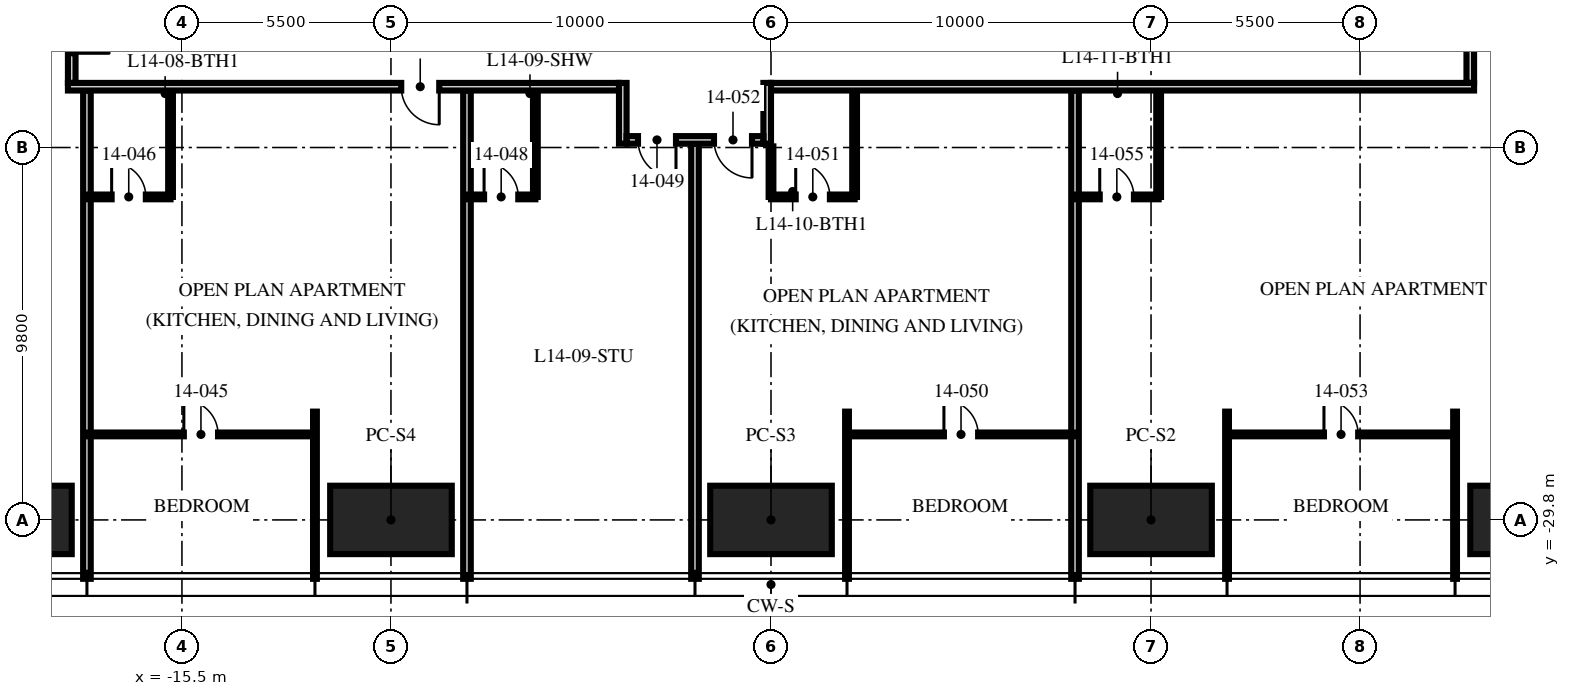
"""IFC4 building model, lengths in metres.
Left out: names, types, materials, properties, quantities, classifications, styles, units other than length and angle.
Written with IfcOpenShell. Run it as: python <this file> out.ifc"""

import sys

from ifc_helpers import new_model, si_unit, direction, frame, frame_2d, origin, origin_2d, place, context, subcontext, project, spatial, rectangle, hollow_rectangle, extrude, element, fill, save


model = new_model("IFC4")
c1 = context("Model", 3, precision=1e-05, world=origin(), true_north=direction((0.0, 1.0)))
c2 = subcontext(c1, "Body", "Model", "MODEL_VIEW")
j1 = project(units=[si_unit("LENGTHUNIT", "METRE"), si_unit("PLANEANGLEUNIT", "RADIAN")], contexts=[c1])
p1 = place(None, origin())
s1 = spatial("IfcSite", under=j1, at=p1, CompositionType="ELEMENT")
p2 = place(p1, origin())
s2 = spatial("IfcBuilding", under=s1, at=p2, CompositionType="ELEMENT")
p3 = place(p2, frame((0.0, 0.0, 58.5)))
s3 = spatial("IfcBuildingStorey", under=s2, at=p3, CompositionType="ELEMENT", Elevation=58.5)
for number, where, z_axis, x_axis in (
    (1, (20.0, -29.8, 0.0), (0.0, 0.0, 1.0), (1.0, 0.0, 0.0)),
    (2, (10.0, -29.8, 0.0), (0.0, 0.0, 1.0), (1.0, 0.0, 0.0)),
    (3, (0.0, -29.8, 0.0), (0.0, 0.0, 1.0), (1.0, 0.0, 0.0)),
    (4, (-10.0, -29.8, 0.0), (0.0, 0.0, 1.0), (1.0, 0.0, 0.0)),
    (5, (-20.0, -29.8, 0.0), (0.0, 0.0, 1.0), (1.0, 0.0, 0.0)),
):
    element("IfcColumn", number, at=place(p3, frame(where, z_axis=z_axis, x_axis=x_axis)), inside=s3, PredefinedType="COLUMN", context=c2, shape_type="SweptSolid", body=[
        extrude(hollow_rectangle(XDim=3.2, YDim=1.8, WallThickness=0.2, at=origin_2d()), origin(), (0.0, 0.0, 1.0), 3.75),
    ])
p4 = place(p3, frame((-18.0, -18.5, 0.0), z_axis=(0.0, 0.0, 1.0), x_axis=(0.0, -1.0, 0.0)))
e6 = element("IfcWall", 6, at=p4, inside=s3, PredefinedType="PARTITIONING", context=c2, shape_type="SweptSolid", body=[
    extrude(rectangle(XDim=12.85, YDim=0.2, at=frame_2d((6.425, 0.0))), origin(), (0.0, 0.0, 1.0), 2.3),
])
p5 = place(p3, frame((-12.0, -26.95, 0.0), z_axis=(0.0, 0.0, 1.0), x_axis=(0.0, -1.0, 0.0)))
e7 = element("IfcWall", 7, at=p5, inside=s3, PredefinedType="PARTITIONING", context=c2, shape_type="SweptSolid", body=[
    extrude(rectangle(XDim=4.4, YDim=0.1, at=frame_2d((2.2, 0.0))), origin(), (0.0, 0.0, 1.0), 2.71),
])
p6 = place(p3, frame((-8.0, -18.5, 0.0), z_axis=(0.0, 0.0, 1.0), x_axis=(0.0, -1.0, 0.0)))
e8 = element("IfcWall", 8, at=p6, inside=s3, PredefinedType="PARTITIONING", context=c2, shape_type="SweptSolid", body=[
    extrude(rectangle(XDim=12.85, YDim=0.2, at=frame_2d((6.425, 0.0))), origin(), (0.0, 0.0, 1.0), 2.71),
])
p7 = place(p3, frame((-2.0, -19.9, 0.0), z_axis=(0.0, 0.0, 1.0), x_axis=(0.0, -1.0, 0.0)))
e9 = element("IfcWall", 9, at=p7, inside=s3, PredefinedType="PARTITIONING", context=c2, shape_type="SweptSolid", body=[
    extrude(rectangle(XDim=11.45, YDim=0.2, at=frame_2d((5.725, 0.0))), origin(), (0.0, 0.0, 1.0), 2.71),
])
p8 = place(p3, frame((2.0, -26.95, 0.0), z_axis=(0.0, 0.0, 1.0), x_axis=(0.0, -1.0, 0.0)))
e10 = element("IfcWall", 10, at=p8, inside=s3, PredefinedType="PARTITIONING", context=c2, shape_type="SweptSolid", body=[
    extrude(rectangle(XDim=4.4, YDim=0.1, at=frame_2d((2.2, 0.0))), origin(), (0.0, 0.0, 1.0), 2.71),
])
p9 = place(p3, frame((8.0, -18.5, 0.0), z_axis=(0.0, 0.0, 1.0), x_axis=(0.0, -1.0, 0.0)))
e11 = element("IfcWall", 11, at=p9, inside=s3, PredefinedType="PARTITIONING", context=c2, shape_type="SweptSolid", body=[
    extrude(rectangle(XDim=12.85, YDim=0.2, at=frame_2d((6.425, 0.0))), origin(), (0.0, 0.0, 1.0), 2.71),
])
for number, where, z_axis, x_axis in (
    (12, (12.0, -26.95, 0.0), (0.0, 0.0, 1.0), (0.0, -1.0, 0.0)),
    (13, (18.0, -26.95, 0.0), (0.0, 0.0, 1.0), (0.0, -1.0, 0.0)),
):
    element("IfcWall", number, at=place(p3, frame(where, z_axis=z_axis, x_axis=x_axis)), inside=s3, PredefinedType="PARTITIONING", context=c2, shape_type="SweptSolid", body=[
        extrude(rectangle(XDim=4.4, YDim=0.1, at=frame_2d((2.2, 0.0))), origin(), (0.0, 0.0, 1.0), 2.71),
    ])
p10 = place(p3, frame((-18.0, -27.55, 0.0), z_axis=(0.0, 0.0, 1.0), x_axis=(1.0, 0.0, 0.0)))
e14 = element("IfcWall", 14, at=p10, inside=s3, PredefinedType="PARTITIONING", context=c2, shape_type="SweptSolid", body=[
    extrude(rectangle(XDim=6.0, YDim=0.1, at=frame_2d((3.0, 0.0))), origin(), (0.0, 0.0, 1.0), 2.61),
])
p11 = place(p10, frame((2.55, 0.0, 0.0)))
e15 = element("IfcOpeningElement", 15, at=p11, cuts=e14, PredefinedType="OPENING", context=c2, shape_type="SweptSolid", body=[
    extrude(rectangle(XDim=0.9, YDim=2.1, at=frame_2d((0.45, 1.05))), frame((0.0, 0.06, 0.0), z_axis=(0.0, -1.0, 0.0), x_axis=(1.0, 0.0, 0.0)), (0.0, 0.0, 1.0), 0.12),
])
p12 = place(p3, frame((-18.0, -21.3, 0.0), z_axis=(0.0, 0.0, 1.0), x_axis=(1.0, 0.0, 0.0)))
e16 = element("IfcWall", 16, at=p12, inside=s3, PredefinedType="PARTITIONING", context=c2, shape_type="SweptSolid", body=[
    extrude(rectangle(XDim=2.2, YDim=0.125, at=frame_2d((1.1, 0.0))), origin(), (0.0, 0.0, 1.0), 3.5),
])
p13 = place(p12, frame((0.65, 0.0, 0.0)))
e17 = element("IfcOpeningElement", 17, at=p13, cuts=e16, PredefinedType="OPENING", context=c2, shape_type="SweptSolid", body=[
    extrude(rectangle(XDim=0.9, YDim=2.1, at=frame_2d((0.45, 1.05))), frame((0.0, 0.073, 0.0), z_axis=(0.0, -1.0, 0.0), x_axis=(1.0, 0.0, 0.0)), (0.0, 0.0, 1.0), 0.145),
])
p14 = place(p3, frame((-15.8, -18.5, 0.0), z_axis=(0.0, 0.0, 1.0), x_axis=(0.0, -1.0, 0.0)))
e18 = element("IfcWall", 18, at=p14, inside=s3, PredefinedType="PARTITIONING", context=c2, shape_type="SweptSolid", body=[
    extrude(rectangle(XDim=2.8, YDim=0.125, at=frame_2d((1.4, 0.0))), origin(), (0.0, 0.0, 1.0), 3.5),
])
p15 = place(p3, frame((-8.0, -21.3, 0.0), z_axis=(0.0, 0.0, 1.0), x_axis=(1.0, 0.0, 0.0)))
e19 = element("IfcWall", 19, at=p15, inside=s3, PredefinedType="PARTITIONING", context=c2, shape_type="SweptSolid", body=[
    extrude(rectangle(XDim=1.8, YDim=0.125, at=frame_2d((0.9, 0.0))), origin(), (0.0, 0.0, 1.0), 3.5),
])
p16 = place(p15, frame((0.45, 0.0, 0.0)))
e20 = element("IfcOpeningElement", 20, at=p16, cuts=e19, PredefinedType="OPENING", context=c2, shape_type="SweptSolid", body=[
    extrude(rectangle(XDim=0.9, YDim=2.1, at=frame_2d((0.45, 1.05))), frame((0.0, 0.073, 0.0), z_axis=(0.0, -1.0, 0.0), x_axis=(1.0, 0.0, 0.0)), (0.0, 0.0, 1.0), 0.145),
])
p17 = place(p3, frame((-6.2, -18.5, 0.0), z_axis=(0.0, 0.0, 1.0), x_axis=(0.0, -1.0, 0.0)))
e21 = element("IfcWall", 21, at=p17, inside=s3, PredefinedType="PARTITIONING", context=c2, shape_type="SweptSolid", body=[
    extrude(rectangle(XDim=2.8, YDim=0.125, at=frame_2d((1.4, 0.0))), origin(), (0.0, 0.0, 1.0), 3.5),
])
p18 = place(p3, frame((2.0, -27.55, 0.0), z_axis=(0.0, 0.0, 1.0), x_axis=(1.0, 0.0, 0.0)))
e22 = element("IfcWall", 22, at=p18, inside=s3, PredefinedType="PARTITIONING", context=c2, shape_type="SweptSolid", body=[
    extrude(rectangle(XDim=6.0, YDim=0.1, at=frame_2d((3.0, 0.0))), origin(), (0.0, 0.0, 1.0), 2.61),
])
p19 = place(p18, frame((2.55, 0.0, 0.0)))
e23 = element("IfcOpeningElement", 23, at=p19, cuts=e22, PredefinedType="OPENING", context=c2, shape_type="SweptSolid", body=[
    extrude(rectangle(XDim=0.9, YDim=2.1, at=frame_2d((0.45, 1.05))), frame((0.0, 0.06, 0.0), z_axis=(0.0, -1.0, 0.0), x_axis=(1.0, 0.0, 0.0)), (0.0, 0.0, 1.0), 0.12),
])
p20 = place(p3, frame((0.0, -21.3, 0.0), z_axis=(0.0, 0.0, 1.0), x_axis=(1.0, 0.0, 0.0)))
e24 = element("IfcWall", 24, at=p20, inside=s3, PredefinedType="PARTITIONING", context=c2, shape_type="SweptSolid", body=[
    extrude(rectangle(XDim=2.2, YDim=0.125, at=frame_2d((1.1, 0.0))), origin(), (0.0, 0.0, 1.0), 2.492),
])
p21 = place(p20, frame((0.65, 0.0, 0.0)))
e25 = element("IfcOpeningElement", 25, at=p21, cuts=e24, PredefinedType="OPENING", context=c2, shape_type="SweptSolid", body=[
    extrude(rectangle(XDim=0.9, YDim=2.1, at=frame_2d((0.45, 1.05))), frame((0.0, 0.073, 0.0), z_axis=(0.0, -1.0, 0.0), x_axis=(1.0, 0.0, 0.0)), (0.0, 0.0, 1.0), 0.145),
])
p22 = place(p3, frame((0.0, -19.97, 0.0), z_axis=(0.0, 0.0, 1.0), x_axis=(0.0, -1.0, 0.0)))
e26 = element("IfcWall", 26, at=p22, inside=s3, PredefinedType="PARTITIONING", context=c2, shape_type="SweptSolid", body=[
    extrude(rectangle(XDim=1.33, YDim=0.125, at=frame_2d((0.665, 0.0))), origin(), (0.0, 0.0, 1.0), 2.492),
])
p23 = place(p3, frame((2.2, -18.5, 0.0), z_axis=(0.0, 0.0, 1.0), x_axis=(0.0, -1.0, 0.0)))
e27 = element("IfcWall", 27, at=p23, inside=s3, PredefinedType="PARTITIONING", context=c2, shape_type="SweptSolid", body=[
    extrude(rectangle(XDim=2.8, YDim=0.125, at=frame_2d((1.4, 0.0))), origin(), (0.0, 0.0, 1.0), 3.5),
])
p24 = place(p3, frame((12.0, -27.55, 0.0), z_axis=(0.0, 0.0, 1.0), x_axis=(1.0, 0.0, 0.0)))
e28 = element("IfcWall", 28, at=p24, inside=s3, PredefinedType="PARTITIONING", context=c2, shape_type="SweptSolid", body=[
    extrude(rectangle(XDim=6.0, YDim=0.1, at=frame_2d((3.0, 0.0))), origin(), (0.0, 0.0, 1.0), 2.61),
])
p25 = place(p24, frame((2.55, 0.0, 0.0)))
e29 = element("IfcOpeningElement", 29, at=p25, cuts=e28, PredefinedType="OPENING", context=c2, shape_type="SweptSolid", body=[
    extrude(rectangle(XDim=0.9, YDim=2.1, at=frame_2d((0.45, 1.05))), frame((0.0, 0.06, 0.0), z_axis=(0.0, -1.0, 0.0), x_axis=(1.0, 0.0, 0.0)), (0.0, 0.0, 1.0), 0.12),
])
p26 = place(p3, frame((8.0, -21.3, 0.0), z_axis=(0.0, 0.0, 1.0), x_axis=(1.0, 0.0, 0.0)))
e30 = element("IfcWall", 30, at=p26, inside=s3, PredefinedType="PARTITIONING", context=c2, shape_type="SweptSolid", body=[
    extrude(rectangle(XDim=2.2, YDim=0.125, at=frame_2d((1.1, 0.0))), origin(), (0.0, 0.0, 1.0), 2.492),
])
p27 = place(p26, frame((0.65, 0.0, 0.0)))
e31 = element("IfcOpeningElement", 31, at=p27, cuts=e30, PredefinedType="OPENING", context=c2, shape_type="SweptSolid", body=[
    extrude(rectangle(XDim=0.9, YDim=2.1, at=frame_2d((0.45, 1.05))), frame((0.0, 0.073, 0.0), z_axis=(0.0, -1.0, 0.0), x_axis=(1.0, 0.0, 0.0)), (0.0, 0.0, 1.0), 0.145),
])
p28 = place(p3, frame((10.2, -18.5, 0.0), z_axis=(0.0, 0.0, 1.0), x_axis=(0.0, -1.0, 0.0)))
e32 = element("IfcWall", 32, at=p28, inside=s3, PredefinedType="PARTITIONING", context=c2, shape_type="SweptSolid", body=[
    extrude(rectangle(XDim=2.8, YDim=0.125, at=frame_2d((1.4, 0.0))), origin(), (0.0, 0.0, 1.0), 2.492),
])
p29 = place(p3, frame((18.4, -18.3, 0.0), z_axis=(0.0, 0.0, 1.0), x_axis=(0.0, 1.0, 0.0)))
e33 = element("IfcWall", 33, at=p29, inside=s3, PredefinedType="PARTITIONING", context=c2, shape_type="SweptSolid", body=[
    extrude(rectangle(XDim=8.3, YDim=0.2, at=frame_2d((4.15, 0.0))), origin(), (0.0, 0.0, 1.0), 2.3),
])
p30 = place(p3, frame((-18.4, 6.0, 0.0), z_axis=(0.0, 0.0, 1.0), x_axis=(0.0, -1.0, 0.0)))
e34 = element("IfcWall", 34, at=p30, inside=s3, PredefinedType="PARTITIONING", context=c2, shape_type="SweptSolid", body=[
    extrude(rectangle(XDim=24.3, YDim=0.2, at=frame_2d((12.15, 0.0))), origin(), (0.0, 0.0, 1.0), 2.3),
])
p31 = place(p30, frame((22.52, 0.0, 0.0)))
e35 = element("IfcOpeningElement", 35, at=p31, cuts=e34, PredefinedType="OPENING", context=c2, shape_type="SweptSolid", body=[
    extrude(rectangle(XDim=1.0, YDim=2.2, at=frame_2d((0.5, 1.1))), frame((0.0, 0.11, 0.0), z_axis=(0.0, -1.0, 0.0), x_axis=(1.0, 0.0, 0.0)), (0.0, 0.0, 1.0), 0.22),
])
p32 = place(p3, frame((18.5, -18.4, 0.0), z_axis=(0.0, 0.0, 1.0), x_axis=(-1.0, 0.0, 0.0)))
e36 = element("IfcWall", 36, at=p32, inside=s3, PredefinedType="PARTITIONING", context=c2, shape_type="SweptSolid", body=[
    extrude(rectangle(XDim=18.5, YDim=0.2, at=frame_2d((9.25, 0.0))), origin(), (0.0, 0.0, 1.0), 2.3),
])
p33 = place(p3, frame((-0.1, -18.3, 0.0), z_axis=(0.0, 0.0, 1.0), x_axis=(0.0, -1.0, 0.0)))
e37 = element("IfcWall", 37, at=p33, inside=s3, PredefinedType="PARTITIONING", context=c2, shape_type="SweptSolid", body=[
    extrude(rectangle(XDim=1.6, YDim=0.2, at=frame_2d((0.8, 0.0))), origin(), (0.0, 0.0, 1.0), 2.492),
])
p34 = place(p3, frame((-3.9, -18.3, 0.0), z_axis=(0.0, 0.0, 1.0), x_axis=(0.0, -1.0, 0.0)))
e38 = element("IfcWall", 38, at=p34, inside=s3, PredefinedType="PARTITIONING", context=c2, shape_type="SweptSolid", body=[
    extrude(rectangle(XDim=1.6, YDim=0.2, at=frame_2d((0.8, 0.0))), origin(), (0.0, 0.0, 1.0), 3.5),
])
p35 = place(p3, frame((-0.2, -19.8, 0.0), z_axis=(0.0, 0.0, 1.0), x_axis=(-1.0, 0.0, 0.0)))
e39 = element("IfcWall", 39, at=p35, inside=s3, PredefinedType="PARTITIONING", context=c2, shape_type="SweptSolid", body=[
    extrude(rectangle(XDim=3.6, YDim=0.2, at=frame_2d((1.8, 0.0))), origin(), (0.0, 0.0, 1.0), 3.5),
])
p36 = place(p35, frame((2.3, 0.0, 0.0)))
e40 = element("IfcOpeningElement", 40, at=p36, cuts=e39, PredefinedType="OPENING", context=c2, shape_type="SweptSolid", body=[
    extrude(rectangle(XDim=1.0, YDim=2.2, at=frame_2d((0.5, 1.1))), frame((0.0, 0.11, 0.0), z_axis=(0.0, -1.0, 0.0), x_axis=(1.0, 0.0, 0.0)), (0.0, 0.0, 1.0), 0.22),
])
p37 = place(p35, frame((0.3, 0.0, 0.0)))
e41 = element("IfcOpeningElement", 41, at=p37, cuts=e39, PredefinedType="OPENING", context=c2, shape_type="SweptSolid", body=[
    extrude(rectangle(XDim=1.0, YDim=2.2, at=frame_2d((0.5, 1.1))), frame((0.0, 0.11, 0.0), z_axis=(0.0, -1.0, 0.0), x_axis=(1.0, 0.0, 0.0)), (0.0, 0.0, 1.0), 0.22),
])
p38 = place(p3, frame((-4.0, -18.4, 0.0), z_axis=(0.0, 0.0, 1.0), x_axis=(-1.0, 0.0, 0.0)))
e42 = element("IfcWall", 42, at=p38, inside=s3, PredefinedType="PARTITIONING", context=c2, shape_type="SweptSolid", body=[
    extrude(rectangle(XDim=14.5, YDim=0.2, at=frame_2d((7.25, 0.0))), origin(), (0.0, 0.0, 1.0), 2.3),
])
p39 = place(p38, frame((4.73, 0.0, 0.0)))
e43 = element("IfcOpeningElement", 43, at=p39, cuts=e42, PredefinedType="OPENING", context=c2, shape_type="SweptSolid", body=[
    extrude(rectangle(XDim=1.0, YDim=2.2, at=frame_2d((0.5, 1.1))), frame((0.0, 0.11, 0.0), z_axis=(0.0, -1.0, 0.0), x_axis=(1.0, 0.0, 0.0)), (0.0, 0.0, 1.0), 0.22),
])
p40 = place(p31, origin())
e44 = element("IfcDoor", 44, at=p40, inside=s3, OperationType="SINGLE_SWING_RIGHT", PredefinedType="DOOR", context=c2, shape_type="SweptSolid", body=[
    extrude(rectangle(XDim=1.0, YDim=2.2, at=frame_2d((0.5, 1.1))), frame((0.0, 0.025, 0.0), z_axis=(0.0, -1.0, 0.0), x_axis=(1.0, 0.0, 0.0)), (0.0, 0.0, 1.0), 0.05),
])
fill(e35, e44)
p41 = place(p11, origin())
e45 = element("IfcDoor", 45, at=p41, inside=s3, OperationType="SINGLE_SWING_LEFT", PredefinedType="DOOR", context=c2, shape_type="SweptSolid", body=[
    extrude(rectangle(XDim=0.9, YDim=2.1, at=frame_2d((0.45, 1.05))), frame((0.0, 0.025, 0.0), z_axis=(0.0, -1.0, 0.0), x_axis=(1.0, 0.0, 0.0)), (0.0, 0.0, 1.0), 0.05),
])
fill(e15, e45)
p42 = place(p13, origin())
e46 = element("IfcDoor", 46, at=p42, inside=s3, OperationType="SINGLE_SWING_LEFT", PredefinedType="DOOR", context=c2, shape_type="SweptSolid", body=[
    extrude(rectangle(XDim=0.9, YDim=2.1, at=frame_2d((0.45, 1.05))), frame((0.0, 0.025, 0.0), z_axis=(0.0, -1.0, 0.0), x_axis=(1.0, 0.0, 0.0)), (0.0, 0.0, 1.0), 0.05),
])
fill(e17, e46)
p43 = place(p39, origin())
e47 = element("IfcDoor", 47, at=p43, inside=s3, OperationType="SINGLE_SWING_LEFT", PredefinedType="DOOR", context=c2, shape_type="SweptSolid", body=[
    extrude(rectangle(XDim=1.0, YDim=2.2, at=frame_2d((0.5, 1.1))), frame((0.0, 0.025, 0.0), z_axis=(0.0, -1.0, 0.0), x_axis=(1.0, 0.0, 0.0)), (0.0, 0.0, 1.0), 0.05),
])
fill(e43, e47)
p44 = place(p16, origin())
e48 = element("IfcDoor", 48, at=p44, inside=s3, OperationType="SINGLE_SWING_LEFT", PredefinedType="DOOR", context=c2, shape_type="SweptSolid", body=[
    extrude(rectangle(XDim=0.9, YDim=2.1, at=frame_2d((0.45, 1.05))), frame((0.0, 0.025, 0.0), z_axis=(0.0, -1.0, 0.0), x_axis=(1.0, 0.0, 0.0)), (0.0, 0.0, 1.0), 0.05),
])
fill(e20, e48)
p45 = place(p36, origin())
e49 = element("IfcDoor", 49, at=p45, inside=s3, OperationType="SINGLE_SWING_LEFT", PredefinedType="DOOR", context=c2, shape_type="SweptSolid", body=[
    extrude(rectangle(XDim=1.0, YDim=2.2, at=frame_2d((0.5, 1.1))), frame((0.0, 0.025, 0.0), z_axis=(0.0, -1.0, 0.0), x_axis=(1.0, 0.0, 0.0)), (0.0, 0.0, 1.0), 0.05),
])
fill(e40, e49)
p46 = place(p19, origin())
e50 = element("IfcDoor", 50, at=p46, inside=s3, OperationType="SINGLE_SWING_LEFT", PredefinedType="DOOR", context=c2, shape_type="SweptSolid", body=[
    extrude(rectangle(XDim=0.9, YDim=2.1, at=frame_2d((0.45, 1.05))), frame((0.0, 0.025, 0.0), z_axis=(0.0, -1.0, 0.0), x_axis=(1.0, 0.0, 0.0)), (0.0, 0.0, 1.0), 0.05),
])
fill(e23, e50)
p47 = place(p21, origin())
e51 = element("IfcDoor", 51, at=p47, inside=s3, OperationType="SINGLE_SWING_LEFT", PredefinedType="DOOR", context=c2, shape_type="SweptSolid", body=[
    extrude(rectangle(XDim=0.9, YDim=2.1, at=frame_2d((0.45, 1.05))), frame((0.0, 0.025, 0.0), z_axis=(0.0, -1.0, 0.0), x_axis=(1.0, 0.0, 0.0)), (0.0, 0.0, 1.0), 0.05),
])
fill(e25, e51)
p48 = place(p37, origin())
e52 = element("IfcDoor", 52, at=p48, inside=s3, OperationType="SINGLE_SWING_LEFT", PredefinedType="DOOR", context=c2, shape_type="SweptSolid", body=[
    extrude(rectangle(XDim=1.0, YDim=2.2, at=frame_2d((0.5, 1.1))), frame((0.0, 0.025, 0.0), z_axis=(0.0, -1.0, 0.0), x_axis=(1.0, 0.0, 0.0)), (0.0, 0.0, 1.0), 0.05),
])
fill(e41, e52)
p49 = place(p25, origin())
e53 = element("IfcDoor", 53, at=p49, inside=s3, OperationType="SINGLE_SWING_LEFT", PredefinedType="DOOR", context=c2, shape_type="SweptSolid", body=[
    extrude(rectangle(XDim=0.9, YDim=2.1, at=frame_2d((0.45, 1.05))), frame((0.0, 0.025, 0.0), z_axis=(0.0, -1.0, 0.0), x_axis=(1.0, 0.0, 0.0)), (0.0, 0.0, 1.0), 0.05),
])
fill(e29, e53)
p50 = place(p27, origin())
e54 = element("IfcDoor", 54, at=p50, inside=s3, OperationType="SINGLE_SWING_LEFT", PredefinedType="DOOR", context=c2, shape_type="SweptSolid", body=[
    extrude(rectangle(XDim=0.9, YDim=2.1, at=frame_2d((0.45, 1.05))), frame((0.0, 0.025, 0.0), z_axis=(0.0, -1.0, 0.0), x_axis=(1.0, 0.0, 0.0)), (0.0, 0.0, 1.0), 0.05),
])
fill(e31, e54)
save(model, sys.argv[1])
